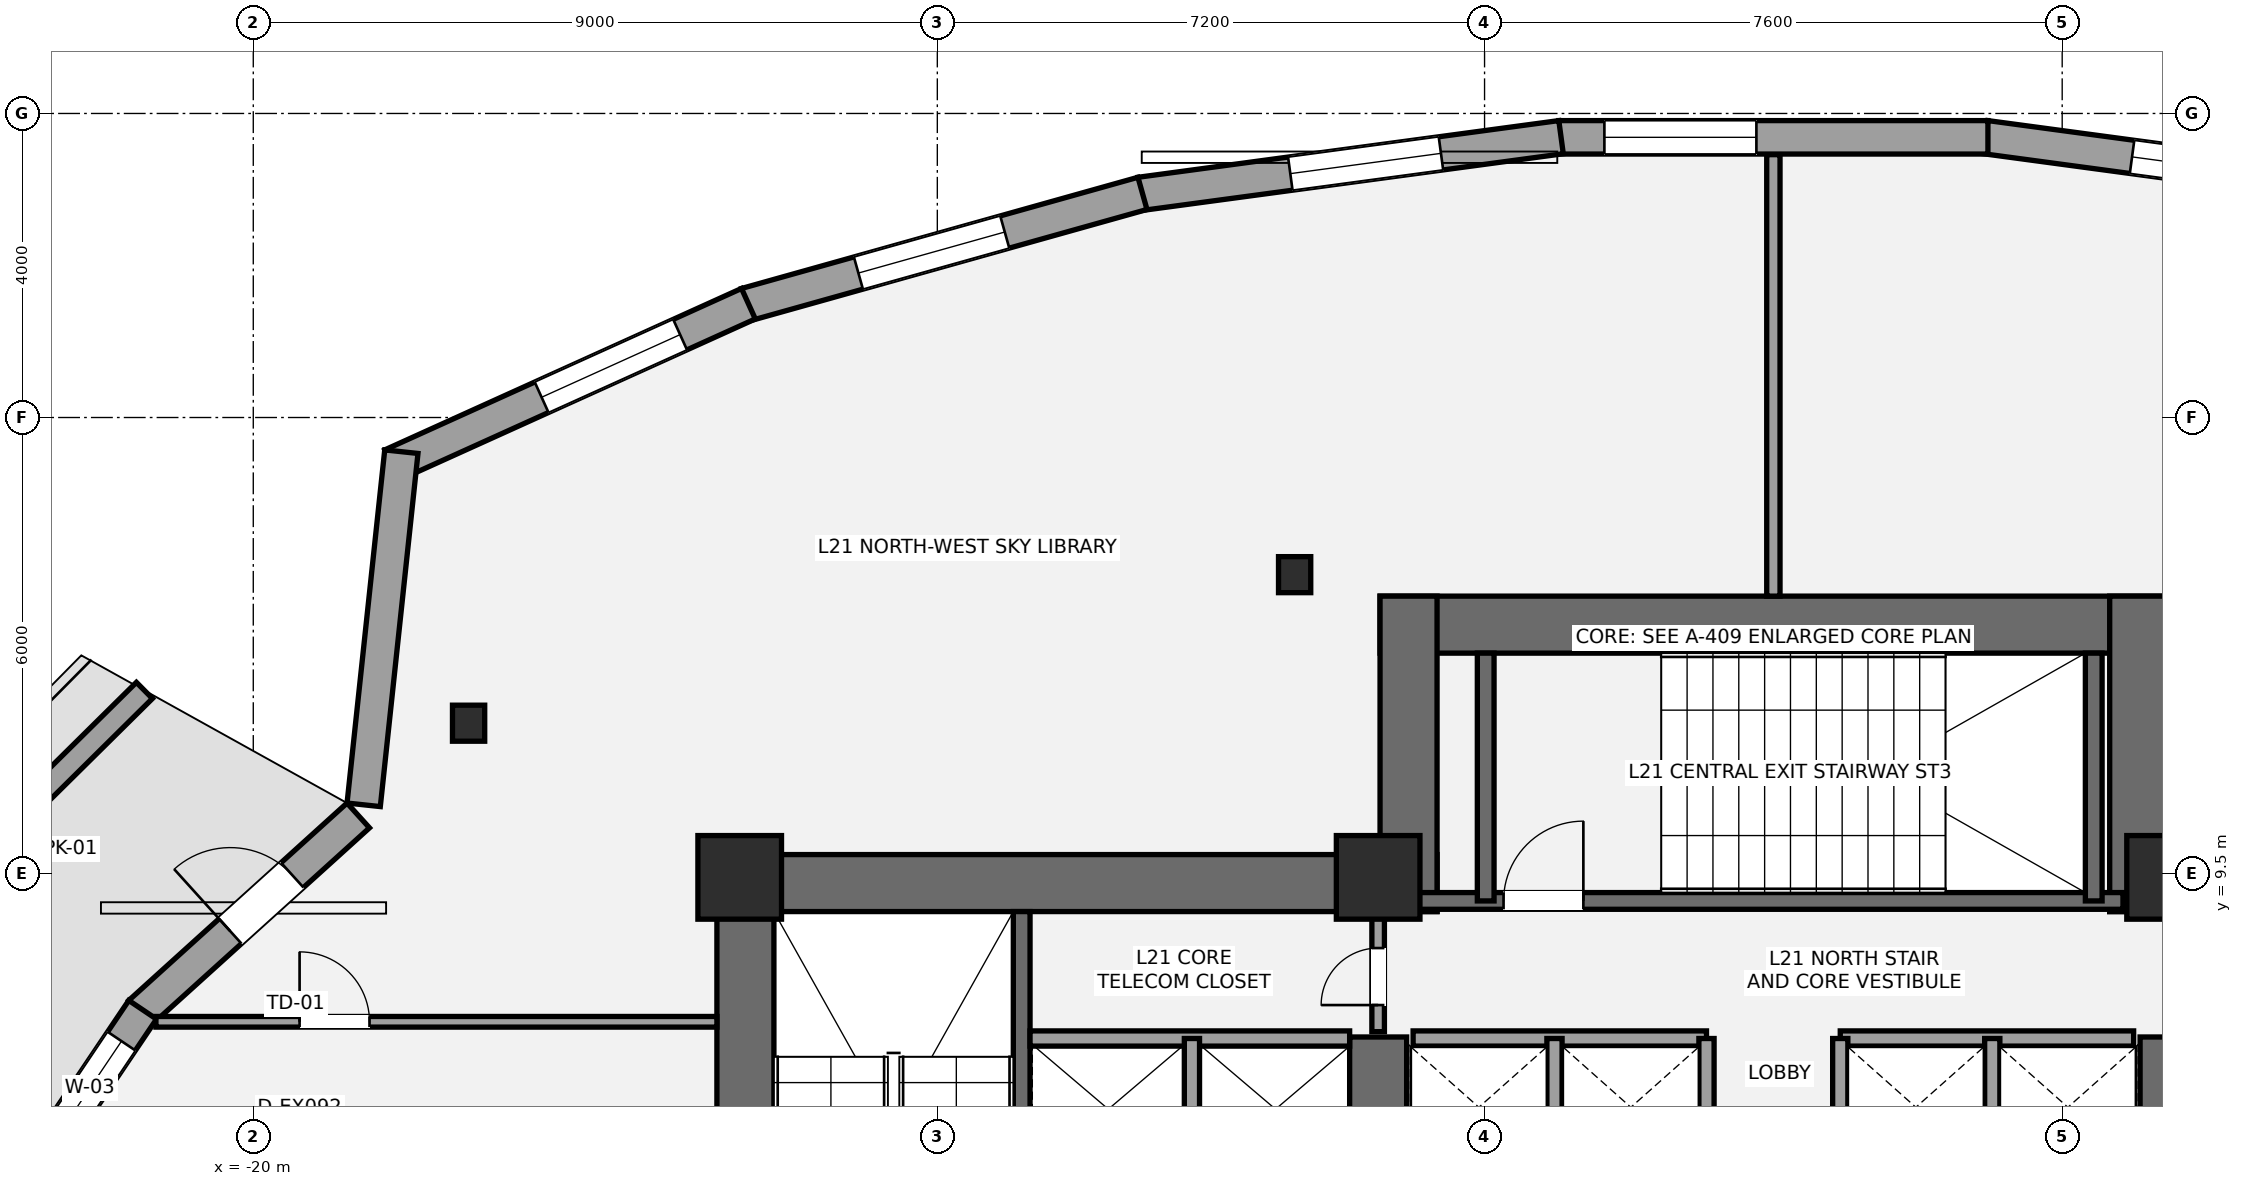
"""IFC4 building model, lengths in metres.
Left out: names, types, materials, properties, quantities, classifications, styles, units other than length and angle.
Written with IfcOpenShell. Run it as: python <this file> out.ifc"""

import sys

from ifc_helpers import new_model, si_unit, direction, frame, frame_2d, origin, origin_2d, place, context, subcontext, project, spatial, rectangle, i_section, extrude, element, fill, save


model = new_model("IFC4")
c1 = context("Model", 3, precision=1e-05, world=origin(), true_north=direction((0.0, 1.0)))
c2 = subcontext(c1, "Body", "Model", "MODEL_VIEW")
j1 = project(units=[si_unit("LENGTHUNIT", "METRE"), si_unit("PLANEANGLEUNIT", "RADIAN")], contexts=[c1])
p1 = place(None, origin())
s1 = spatial("IfcSite", under=j1, at=p1, CompositionType="ELEMENT")
p2 = place(p1, origin())
s2 = spatial("IfcBuilding", under=s1, at=p2, CompositionType="ELEMENT")
p3 = place(p2, frame((0.0, 0.0, 81.9)))
s3 = spatial("IfcBuildingStorey", under=s2, at=p3, CompositionType="ELEMENT", Elevation=81.9)
p4 = place(p3, frame((-13.525, 1.1, 0.0), z_axis=(0.0, 0.0, 1.0), x_axis=(0.0, 1.0, 0.0)))
e1 = element("IfcWall", 1, at=p4, inside=s3, PredefinedType="SHEAR", context=c2, shape_type="SweptSolid", body=[
    extrude(rectangle(XDim=8.65, YDim=0.75, at=frame_2d((4.325, 0.0))), origin(), (0.0, 0.0, 1.0), 4.2),
])
p5 = place(p3, frame((-13.9, 9.375, 0.0), z_axis=(0.0, 0.0, 1.0), x_axis=(1.0, 0.0, 0.0)))
e2 = element("IfcWall", 2, at=p5, inside=s3, PredefinedType="SHEAR", context=c2, shape_type="SweptSolid", body=[
    extrude(rectangle(XDim=9.475, YDim=0.75, at=frame_2d((4.737, 0.0))), origin(), (0.0, 0.0, 1.0), 4.2),
])
p6 = place(p3, frame((-5.2, 5.35, 0.0), z_axis=(0.0, 0.0, 1.0), x_axis=(0.0, 1.0, 0.0)))
e3 = element("IfcWall", 3, at=p6, inside=s3, PredefinedType="SHEAR", context=c2, shape_type="SweptSolid", body=[
    extrude(rectangle(XDim=2.0, YDim=0.75, at=frame_2d((1.0, 0.0))), origin(), (0.0, 0.0, 1.0), 4.2),
])
p7 = place(p3, frame((-9.89, 1.85, 0.0), z_axis=(0.0, 0.0, 1.0), x_axis=(0.0, 1.0, 0.0)))
e4 = element("IfcWall", 4, at=p7, inside=s3, PredefinedType="SHEAR", context=c2, shape_type="SweptSolid", body=[
    extrude(rectangle(XDim=7.15, YDim=0.22, at=frame_2d((3.575, 0.0))), origin(), (0.0, 0.0, 1.0), 4.2),
])
p8 = place(p3, frame((4.425, 9.375, 0.0), z_axis=(0.0, 0.0, 1.0), x_axis=(1.0, 0.0, 0.0)))
e5 = element("IfcWall", 5, at=p8, inside=s3, PredefinedType="SHEAR", context=c2, shape_type="SweptSolid", body=[
    extrude(rectangle(XDim=9.475, YDim=0.75, at=frame_2d((4.737, 0.0))), origin(), (0.0, 0.0, 1.0), 4.2),
])
p9 = place(p3, frame((5.2, 5.35, 0.0), z_axis=(0.0, 0.0, 1.0), x_axis=(0.0, 1.0, 0.0)))
e6 = element("IfcWall", 6, at=p9, inside=s3, PredefinedType="SHEAR", context=c2, shape_type="SweptSolid", body=[
    extrude(rectangle(XDim=2.0, YDim=0.75, at=frame_2d((1.0, 0.0))), origin(), (0.0, 0.0, 1.0), 4.2),
])
p10 = place(p3, frame((-5.175, 12.775, 0.0), z_axis=(0.0, 0.0, 1.0), x_axis=(1.0, 0.0, 0.0)))
e7 = element("IfcWall", 7, at=p10, inside=s3, PredefinedType="SHEAR", context=c2, shape_type="SweptSolid", body=[
    extrude(rectangle(XDim=10.35, YDim=0.75, at=frame_2d((5.175, 0.0))), origin(), (0.0, 0.0, 1.0), 4.2),
])
for number, where, z_axis, x_axis in (
    (8, (-4.8, 9.0, 0.0), (0.0, 0.0, 1.0), (0.0, 1.0, 0.0)),
    (9, (4.8, 9.0, 0.0), (0.0, 0.0, 1.0), (0.0, 1.0, 0.0)),
):
    element("IfcWall", number, at=place(p3, frame(where, z_axis=z_axis, x_axis=x_axis)), inside=s3, PredefinedType="SHEAR", context=c2, shape_type="SweptSolid", body=[
        extrude(rectangle(XDim=4.15, YDim=0.75, at=frame_2d((2.075, 0.0))), origin(), (0.0, 0.0, 1.0), 4.2),
    ])
p11 = place(p3, frame((-4.7, 9.14, 0.0), z_axis=(0.0, 0.0, 1.0), x_axis=(1.0, 0.0, 0.0)))
e10 = element("IfcWall", 10, at=p11, inside=s3, PredefinedType="SHEAR", context=c2, shape_type="SweptSolid", body=[
    extrude(rectangle(XDim=9.3, YDim=0.22, at=frame_2d((4.65, 0.0))), origin(), (0.0, 0.0, 1.0), 4.2),
])
p12 = place(p11, frame((1.15, 0.0, 0.0)))
e11 = element("IfcOpeningElement", 11, at=p12, cuts=e10, PredefinedType="OPENING", context=c2, shape_type="SweptSolid", body=[
    extrude(rectangle(XDim=1.05, YDim=2.15, at=frame_2d((0.525, 1.075))), frame((0.0, 0.12, 0.0), z_axis=(0.0, -1.0, 0.0), x_axis=(1.0, 0.0, 0.0)), (0.0, 0.0, 1.0), 0.24),
])
for number, where, z_axis, x_axis in (
    (12, (-3.785, 9.14, 0.0), (0.0, 0.0, 1.0), (0.0, 1.0, 0.0)),
    (13, (4.215, 9.14, 0.0), (0.0, 0.0, 1.0), (0.0, 1.0, 0.0)),
):
    element("IfcWall", number, at=place(p3, frame(where, z_axis=z_axis, x_axis=x_axis)), inside=s3, PredefinedType="SHEAR", context=c2, shape_type="SweptSolid", body=[
        extrude(rectangle(XDim=3.26, YDim=0.22, at=frame_2d((1.63, 0.0))), origin(), (0.0, 0.0, 1.0), 4.2),
    ])
for number, where, z_axis, x_axis in (
    (14, (-13.6, 9.45, 0.0), (0.0, 0.0, 1.0), (1.0, 0.0, 0.0)),
    (15, (-5.2, 9.45, 0.0), (0.0, 0.0, 1.0), (1.0, 0.0, 0.0)),
    (16, (5.2, 9.45, 0.0), (0.0, 0.0, 1.0), (1.0, 0.0, 0.0)),
):
    element("IfcColumn", number, at=place(p3, frame(where, z_axis=z_axis, x_axis=x_axis)), inside=s3, PredefinedType="COLUMN", context=c2, shape_type="SweptSolid", body=[
        extrude(rectangle(XDim=1.1, YDim=1.1, at=origin_2d()), origin(), (0.0, 0.0, 1.0), 4.2),
    ])
for number, where, z_axis, x_axis in (
    (17, (-6.299, 13.433, 0.0), (0.0, 0.0, 1.0), (1.0, 0.0, 0.0)),
    (18, (-17.167, 11.478, 0.0), (0.0, 0.0, 1.0), (1.0, 0.0, 0.0)),
):
    element("IfcColumn", number, at=place(p3, frame(where, z_axis=z_axis, x_axis=x_axis)), inside=s3, PredefinedType="COLUMN", context=c2, shape_type="SweptSolid", body=[
        extrude(i_section(OverallWidth=0.424, OverallDepth=0.474, WebThickness=0.048, FlangeThickness=0.077, at=origin_2d()), origin(), (0.0, 0.0, 1.0), 4.2),
    ])
p13 = place(p3, frame((2.793, 19.188, 0.0), z_axis=(0.0, 0.0, 1.0), x_axis=(0.9910561058, -0.133445851026, 0.0)))
e19 = element("IfcWall", 19, at=p13, inside=s3, PredefinedType="STANDARD", context=c2, shape_type="SweptSolid", body=[
    extrude(rectangle(XDim=5.587, YDim=0.44, at=frame_2d((2.794, 0.0))), origin(), (0.0, 0.0, 1.0), 3.228),
])
p14 = place(p13, frame((1.943, 0.0, 0.6)))
e20 = element("IfcOpeningElement", 20, at=p14, cuts=e19, PredefinedType="OPENING", context=c2, shape_type="SweptSolid", body=[
    extrude(rectangle(XDim=2.0, YDim=2.1, at=frame_2d((1.0, 1.05))), frame((0.0, 0.23, 0.0), z_axis=(0.0, -1.0, 0.0), x_axis=(1.0, 0.0, 0.0)), (0.0, 0.0, 1.0), 0.46),
])
p15 = place(p3, frame((-2.823, 19.186, 0.0), z_axis=(0.0, 0.0, 1.0), x_axis=(1.0, 0.0, 0.0)))
e21 = element("IfcWall", 21, at=p15, inside=s3, PredefinedType="STANDARD", context=c2, shape_type="SweptSolid", body=[
    extrude(rectangle(XDim=5.646, YDim=0.44, at=frame_2d((2.823, 0.0))), origin(), (0.0, 0.0, 1.0), 3.232),
])
p16 = place(p15, frame((0.6, 0.0, 0.6)))
e22 = element("IfcOpeningElement", 22, at=p16, cuts=e21, PredefinedType="OPENING", context=c2, shape_type="SweptSolid", body=[
    extrude(rectangle(XDim=2.0, YDim=2.1, at=frame_2d((1.0, 1.05))), frame((0.0, 0.23, 0.0), z_axis=(0.0, -1.0, 0.0), x_axis=(1.0, 0.0, 0.0)), (0.0, 0.0, 1.0), 0.46),
])
p17 = place(p3, frame((-8.331, 18.442, 0.0), z_axis=(0.0, 0.0, 1.0), x_axis=(0.9910561058, 0.133445851026, 0.0)))
e23 = element("IfcWall", 23, at=p17, inside=s3, PredefinedType="STANDARD", context=c2, shape_type="SweptSolid", body=[
    extrude(rectangle(XDim=5.587, YDim=0.44, at=frame_2d((2.794, 0.0))), origin(), (0.0, 0.0, 1.0), 3.228),
])
p18 = place(p17, frame((1.993, 0.0, 0.6)))
e24 = element("IfcOpeningElement", 24, at=p18, cuts=e23, PredefinedType="OPENING", context=c2, shape_type="SweptSolid", body=[
    extrude(rectangle(XDim=2.0, YDim=2.1, at=frame_2d((1.0, 1.05))), frame((0.0, 0.23, 0.0), z_axis=(0.0, -1.0, 0.0), x_axis=(1.0, 0.0, 0.0)), (0.0, 0.0, 1.0), 0.46),
])
p19 = place(p3, frame((-13.517, 16.986, 0.0), z_axis=(0.0, 0.0, 1.0), x_axis=(0.962849260033, 0.270039446109, 0.0)))
e25 = element("IfcWall", 25, at=p19, inside=s3, PredefinedType="STANDARD", context=c2, shape_type="SweptSolid", body=[
    extrude(rectangle(XDim=5.417, YDim=0.44, at=frame_2d((2.708, 0.0))), origin(), (0.0, 0.0, 1.0), 3.228),
])
p20 = place(p19, frame((1.535, 0.0, 0.6)))
e26 = element("IfcOpeningElement", 26, at=p20, cuts=e25, PredefinedType="OPENING", context=c2, shape_type="SweptSolid", body=[
    extrude(rectangle(XDim=2.0, YDim=2.1, at=frame_2d((1.0, 1.05))), frame((0.0, 0.23, 0.0), z_axis=(0.0, -1.0, 0.0), x_axis=(1.0, 0.0, 0.0)), (0.0, 0.0, 1.0), 0.46),
])
p21 = place(p3, frame((-18.18, 14.873, 0.0), z_axis=(0.0, 0.0, 1.0), x_axis=(0.911088856004, 0.412210014999, 0.0)))
e27 = element("IfcWall", 27, at=p21, inside=s3, PredefinedType="STANDARD", context=c2, shape_type="SweptSolid", body=[
    extrude(rectangle(XDim=5.152, YDim=0.44, at=frame_2d((2.576, 0.0))), origin(), (0.0, 0.0, 1.0), 3.228),
])
p22 = place(p21, frame((2.166, 0.0, 0.6)))
e28 = element("IfcOpeningElement", 28, at=p22, cuts=e27, PredefinedType="OPENING", context=c2, shape_type="SweptSolid", body=[
    extrude(rectangle(XDim=2.0, YDim=2.1, at=frame_2d((1.0, 1.05))), frame((0.0, 0.23, 0.0), z_axis=(0.0, -1.0, 0.0), x_axis=(1.0, 0.0, 0.0)), (0.0, 0.0, 1.0), 0.46),
])
p23 = place(p3, frame((-18.547, 10.405, 0.0), z_axis=(0.0, 0.0, 1.0), x_axis=(0.106077381467, 0.994357877799, 0.0)))
e29 = element("IfcWall", 29, at=p23, inside=s3, PredefinedType="STANDARD", context=c2, shape_type="SweptSolid", body=[
    extrude(rectangle(XDim=4.672, YDim=0.44, at=frame_2d((2.336, 0.0))), origin(), (0.0, 0.0, 1.0), 3.228),
])
p24 = place(p3, frame((-21.49, 7.668, 0.0), z_axis=(0.0, 0.0, 1.0), x_axis=(0.741715011028, 0.670715172346, 0.0)))
e30 = element("IfcWall", 30, at=p24, inside=s3, PredefinedType="STANDARD", context=c2, shape_type="SweptSolid", body=[
    extrude(rectangle(XDim=3.872, YDim=0.44, at=frame_2d((1.936, 0.0))), origin(), (0.0, 0.0, 1.0), 3.232),
])
p25 = place(p24, frame((1.601, 0.0, 0.0)))
e31 = element("IfcOpeningElement", 31, at=p25, cuts=e30, PredefinedType="OPENING", context=c2, shape_type="SweptSolid", body=[
    extrude(rectangle(XDim=1.1, YDim=2.15, at=frame_2d((0.55, 1.075))), frame((0.0, 0.23, 0.0), z_axis=(0.0, -1.0, 0.0), x_axis=(1.0, 0.0, 0.0)), (0.0, 0.0, 1.0), 0.46),
])
p26 = place(p3, frame((-23.459, 4.733, 0.0), z_axis=(0.0, 0.0, 1.0), x_axis=(0.558605157635, 0.829433709143, 0.0)))
e32 = element("IfcWall", 32, at=p26, inside=s3, PredefinedType="STANDARD", context=c2, shape_type="SweptSolid", body=[
    extrude(rectangle(XDim=3.587, YDim=0.44, at=frame_2d((1.793, 0.0))), origin(), (0.0, 0.0, 1.0), 3.232),
])
p27 = place(p26, frame((1.589, 0.0, 0.6)))
e33 = element("IfcOpeningElement", 33, at=p27, cuts=e32, PredefinedType="OPENING", context=c2, shape_type="SweptSolid", body=[
    extrude(rectangle(XDim=1.5, YDim=1.7, at=frame_2d((0.75, 0.85))), frame((0.0, 0.23, 0.0), z_axis=(0.0, -1.0, 0.0), x_axis=(1.0, 0.0, 0.0)), (0.0, 0.0, 1.0), 0.46),
])
p28 = place(p3, frame((-21.432, 11.909, 0.0), z_axis=(0.0, 0.0, 1.0), x_axis=(-0.710964434321, -0.703227966687, 0.0)))
e34 = element("IfcWall", 34, at=p28, inside=s3, PredefinedType="PARAPET", context=c2, shape_type="SweptSolid", body=[
    extrude(rectangle(XDim=4.323, YDim=0.3, at=frame_2d((2.162, 0.0))), origin(), (0.0, 0.0, 1.0), 0.45),
])
p29 = place(p3, frame((-9.78, 7.33, 0.0), z_axis=(0.0, 0.0, 1.0), x_axis=(1.0, 0.0, 0.0)))
e35 = element("IfcWall", 35, at=p29, inside=s3, PredefinedType="SOLIDWALL", context=c2, shape_type="SweptSolid", body=[
    extrude(rectangle(XDim=4.205, YDim=0.2, at=frame_2d((2.103, 0.0))), origin(), (0.0, 0.0, 1.0), 4.01),
])
p30 = place(p3, frame((-7.65, 5.47, 0.0), z_axis=(0.0, 0.0, 1.0), x_axis=(0.0, 1.0, 0.0)))
e36 = element("IfcWall", 36, at=p30, inside=s3, PredefinedType="SOLIDWALL", context=c2, shape_type="SweptSolid", body=[
    extrude(rectangle(XDim=1.86, YDim=0.2, at=frame_2d((0.93, 0.0))), origin(), (0.0, 0.0, 1.0), 4.01),
])
for number, where, z_axis, x_axis in (
    (37, (-4.74, 7.33, 0.0), (0.0, 0.0, 1.0), (1.0, 0.0, 0.0)),
    (38, (0.88, 7.33, 0.0), (0.0, 0.0, 1.0), (1.0, 0.0, 0.0)),
):
    element("IfcWall", number, at=place(p3, frame(where, z_axis=z_axis, x_axis=x_axis)), inside=s3, PredefinedType="SOLIDWALL", context=c2, shape_type="SweptSolid", body=[
        extrude(rectangle(XDim=3.86, YDim=0.2, at=frame_2d((1.93, 0.0))), origin(), (0.0, 0.0, 1.0), 4.01),
    ])
for number, where, z_axis, x_axis in (
    (39, (-2.88, 5.52, 0.0), (0.0, 0.0, 1.0), (0.0, 1.0, 0.0)),
    (40, (2.88, 5.52, 0.0), (0.0, 0.0, 1.0), (0.0, 1.0, 0.0)),
    (41, (-0.88, 5.52, 0.0), (0.0, 0.0, 1.0), (0.0, 1.0, 0.0)),
    (42, (0.88, 5.52, 0.0), (0.0, 0.0, 1.0), (0.0, 1.0, 0.0)),
):
    element("IfcWall", number, at=place(p3, frame(where, z_axis=z_axis, x_axis=x_axis)), inside=s3, PredefinedType="SOLIDWALL", context=c2, shape_type="SweptSolid", body=[
        extrude(rectangle(XDim=1.81, YDim=0.2, at=frame_2d((0.905, 0.0))), origin(), (0.0, 0.0, 1.0), 4.01),
    ])
p31 = place(p3, frame((-5.2, 7.42, 0.0), z_axis=(0.0, 0.0, 1.0), x_axis=(0.0, 1.0, 0.0)))
e43 = element("IfcWall", 43, at=p31, inside=s3, PredefinedType="PARTITIONING", context=c2, shape_type="SweptSolid", body=[
    extrude(rectangle(XDim=1.58, YDim=0.165, at=frame_2d((0.79, 0.0))), origin(), (0.0, 0.0, 1.0), 4.01),
])
p32 = place(p31, frame((0.35, 0.0, 0.0)))
e44 = element("IfcOpeningElement", 44, at=p32, cuts=e43, PredefinedType="OPENING", context=c2, shape_type="SweptSolid", body=[
    extrude(rectangle(XDim=0.75, YDim=2.1, at=frame_2d((0.375, 1.05))), frame((0.0, 0.093, 0.0), z_axis=(0.0, -1.0, 0.0), x_axis=(1.0, 0.0, 0.0)), (0.0, 0.0, 1.0), 0.185),
])
p33 = place(p3, frame((-21.281, 7.55, 0.0), z_axis=(0.0, 0.0, 1.0), x_axis=(1.0, 0.0, 0.0)))
e45 = element("IfcWall", 45, at=p33, inside=s3, PredefinedType="PARTITIONING", context=c2, shape_type="SweptSolid", body=[
    extrude(rectangle(XDim=7.381, YDim=0.14, at=frame_2d((3.69, 0.0))), origin(), (0.0, 0.0, 1.0), 3.463),
])
p34 = place(p33, frame((1.89, 0.0, 0.0)))
e46 = element("IfcOpeningElement", 46, at=p34, cuts=e45, PredefinedType="OPENING", context=c2, shape_type="SweptSolid", body=[
    extrude(rectangle(XDim=0.92, YDim=2.15, at=frame_2d((0.46, 1.075))), frame((0.0, 0.08, 0.0), z_axis=(0.0, -1.0, 0.0), x_axis=(1.0, 0.0, 0.0)), (0.0, 0.0, 1.0), 0.16),
])
p35 = place(p3, frame((0.0, 13.15, 0.0), z_axis=(0.0, 0.0, 1.0), x_axis=(0.0, 1.0, 0.0)))
e47 = element("IfcWall", 47, at=p35, inside=s3, PredefinedType="PARTITIONING", context=c2, shape_type="SweptSolid", body=[
    extrude(rectangle(XDim=5.808, YDim=0.175, at=frame_2d((2.904, 0.0))), origin(), (0.0, 0.0, 1.0), 3.463),
])
p36 = place(p14, origin())
e48 = element("IfcWindow", 48, at=p36, inside=s3, PartitioningType="SINGLE_PANEL", PredefinedType="WINDOW", context=c2, shape_type="SweptSolid", body=[
    extrude(rectangle(XDim=2.0, YDim=2.1, at=frame_2d((1.0, 1.05))), frame((0.0, -0.01, 0.0), z_axis=(0.0, -1.0, 0.0), x_axis=(1.0, 0.0, 0.0)), (0.0, 0.0, 1.0), 0.06),
])
fill(e20, e48)
p37 = place(p16, origin())
e49 = element("IfcWindow", 49, at=p37, inside=s3, PartitioningType="SINGLE_PANEL", PredefinedType="WINDOW", context=c2, shape_type="SweptSolid", body=[
    extrude(rectangle(XDim=2.0, YDim=2.1, at=frame_2d((1.0, 1.05))), frame((0.0, -0.01, 0.0), z_axis=(0.0, -1.0, 0.0), x_axis=(1.0, 0.0, 0.0)), (0.0, 0.0, 1.0), 0.06),
])
fill(e22, e49)
p38 = place(p18, origin())
e50 = element("IfcWindow", 50, at=p38, inside=s3, PartitioningType="SINGLE_PANEL", PredefinedType="WINDOW", context=c2, shape_type="SweptSolid", body=[
    extrude(rectangle(XDim=2.0, YDim=2.1, at=frame_2d((1.0, 1.05))), frame((0.0, -0.01, 0.0), z_axis=(0.0, -1.0, 0.0), x_axis=(1.0, 0.0, 0.0)), (0.0, 0.0, 1.0), 0.06),
])
fill(e24, e50)
p39 = place(p20, origin())
e51 = element("IfcWindow", 51, at=p39, inside=s3, PartitioningType="SINGLE_PANEL", PredefinedType="WINDOW", context=c2, shape_type="SweptSolid", body=[
    extrude(rectangle(XDim=2.0, YDim=2.1, at=frame_2d((1.0, 1.05))), frame((0.0, -0.01, 0.0), z_axis=(0.0, -1.0, 0.0), x_axis=(1.0, 0.0, 0.0)), (0.0, 0.0, 1.0), 0.06),
])
fill(e26, e51)
p40 = place(p22, origin())
e52 = element("IfcWindow", 52, at=p40, inside=s3, PartitioningType="SINGLE_PANEL", PredefinedType="WINDOW", context=c2, shape_type="SweptSolid", body=[
    extrude(rectangle(XDim=2.0, YDim=2.1, at=frame_2d((1.0, 1.05))), frame((0.0, -0.01, 0.0), z_axis=(0.0, -1.0, 0.0), x_axis=(1.0, 0.0, 0.0)), (0.0, 0.0, 1.0), 0.06),
])
fill(e28, e52)
p41 = place(p25, origin())
e53 = element("IfcDoor", 53, at=p41, inside=s3, OperationType="SINGLE_SWING_LEFT", PredefinedType="DOOR", context=c2, shape_type="SweptSolid", body=[
    extrude(rectangle(XDim=1.1, YDim=2.15, at=frame_2d((0.55, 1.075))), frame((0.0, 0.025, 0.0), z_axis=(0.0, -1.0, 0.0), x_axis=(1.0, 0.0, 0.0)), (0.0, 0.0, 1.0), 0.05),
])
fill(e31, e53)
p42 = place(p27, origin())
e54 = element("IfcWindow", 54, at=p42, inside=s3, PartitioningType="SINGLE_PANEL", PredefinedType="WINDOW", context=c2, shape_type="SweptSolid", body=[
    extrude(rectangle(XDim=1.5, YDim=1.7, at=frame_2d((0.75, 0.85))), frame((0.0, -0.01, 0.0), z_axis=(0.0, -1.0, 0.0), x_axis=(1.0, 0.0, 0.0)), (0.0, 0.0, 1.0), 0.06),
])
fill(e33, e54)
p43 = place(p12, origin())
e55 = element("IfcDoor", 55, at=p43, inside=s3, OperationType="SINGLE_SWING_RIGHT", PredefinedType="DOOR", context=c2, shape_type="SweptSolid", body=[
    extrude(rectangle(XDim=1.05, YDim=2.15, at=frame_2d((0.525, 1.075))), frame((0.0, 0.025, 0.0), z_axis=(0.0, -1.0, 0.0), x_axis=(1.0, 0.0, 0.0)), (0.0, 0.0, 1.0), 0.05),
])
fill(e11, e55)
p44 = place(p32, origin())
e56 = element("IfcDoor", 56, at=p44, inside=s3, OperationType="SINGLE_SWING_LEFT", PredefinedType="DOOR", context=c2, shape_type="SweptSolid", body=[
    extrude(rectangle(XDim=0.75, YDim=2.1, at=frame_2d((0.375, 1.05))), frame((0.0, 0.025, 0.0), z_axis=(0.0, -1.0, 0.0), x_axis=(1.0, 0.0, 0.0)), (0.0, 0.0, 1.0), 0.05),
])
fill(e44, e56)
p45 = place(p34, origin())
e57 = element("IfcDoor", 57, at=p45, inside=s3, OperationType="SINGLE_SWING_LEFT", PredefinedType="DOOR", context=c2, shape_type="SweptSolid", body=[
    extrude(rectangle(XDim=0.92, YDim=2.15, at=frame_2d((0.46, 1.075))), frame((0.0, 0.025, 0.0), z_axis=(0.0, -1.0, 0.0), x_axis=(1.0, 0.0, 0.0)), (0.0, 0.0, 1.0), 0.05),
])
fill(e46, e57)
save(model, sys.argv[1])
